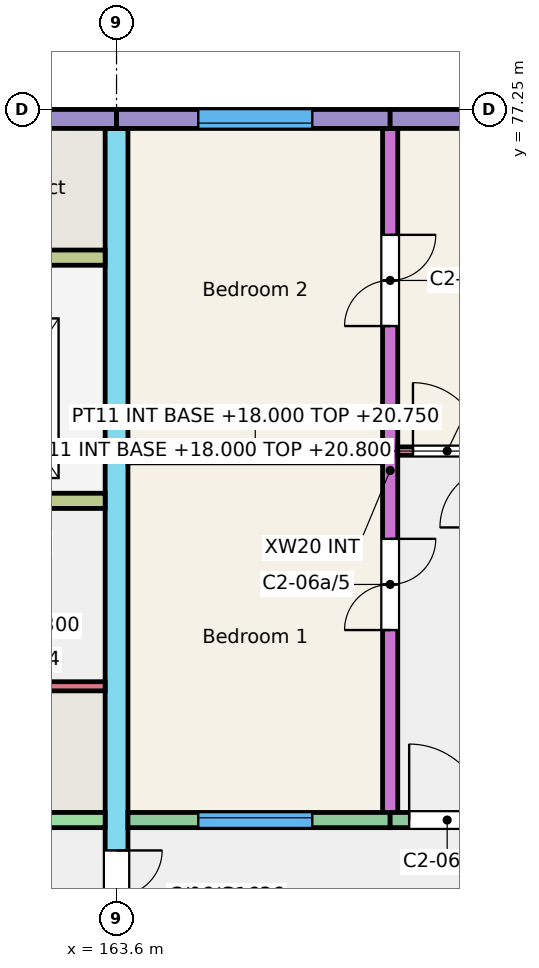
"""IFC4 building model, lengths in metres.
Left out: names, types, materials, properties, quantities, classifications, styles, units other than length and angle.
Written with IfcOpenShell. Run it as: python <this file> out.ifc"""

import sys

from ifc_helpers import new_model, si_unit, direction, frame, frame_2d, origin, place, context, subcontext, project, spatial, rectangle, extrude, element, fill, save


model = new_model("IFC4")
c1 = context("Model", 3, precision=1e-05, world=origin(), true_north=direction((0.0, 1.0)))
c2 = subcontext(c1, "Body", "Model", "MODEL_VIEW")
j1 = project(units=[si_unit("LENGTHUNIT", "METRE"), si_unit("PLANEANGLEUNIT", "RADIAN")], contexts=[c1])
p1 = place(None, origin())
s1 = spatial("IfcSite", under=j1, at=p1, CompositionType="ELEMENT")
p2 = place(p1, origin())
s2 = spatial("IfcBuilding", under=s1, at=p2, CompositionType="ELEMENT")
p3 = place(p2, frame((0.0, 0.0, 18.0)))
s3 = spatial("IfcBuildingStorey", under=s2, at=p3, CompositionType="ELEMENT", Elevation=18.0)
p4 = place(p3, frame((163.6, 66.0, 0.0), z_axis=(0.0, 0.0, 1.0), x_axis=(0.0, 1.0, 0.0)))
e1 = element("IfcWall", 1, at=p4, inside=s3, PredefinedType="SHEAR", context=c2, shape_type="SweptSolid", body=[
    extrude(rectangle(XDim=11.0, YDim=0.3, at=frame_2d((5.5, 0.0))), origin(), (0.0, 0.0, 1.0), 3.0),
])
p5 = place(p4, frame((0.3, 0.0, 0.0)))
e2 = element("IfcOpeningElement", 2, at=p5, cuts=e1, PredefinedType="OPENING", context=c2, shape_type="SweptSolid", body=[
    extrude(rectangle(XDim=1.2, YDim=2.1, at=frame_2d((0.6, 1.05))), frame((0.0, 0.16, 0.0), z_axis=(0.0, -1.0, 0.0), x_axis=(1.0, 0.0, 0.0)), (0.0, 0.0, 1.0), 0.32),
])
p6 = place(p3, frame((167.2, 68.0, 0.0), z_axis=(0.0, 0.0, 1.0), x_axis=(0.0, 1.0, 0.0)))
e3 = element("IfcWall", 3, at=p6, inside=s3, PredefinedType="SHEAR", context=c2, shape_type="SweptSolid", body=[
    extrude(rectangle(XDim=9.0, YDim=0.2, at=frame_2d((4.5, 0.0))), origin(), (0.0, 0.0, 1.0), 3.0),
])
p7 = place(p6, frame((2.4, 0.0, 0.0)))
e4 = element("IfcOpeningElement", 4, at=p7, cuts=e3, PredefinedType="OPENING", context=c2, shape_type="SweptSolid", body=[
    extrude(rectangle(XDim=1.2, YDim=2.1, at=frame_2d((0.6, 1.05))), frame((0.0, 0.11, 0.0), z_axis=(0.0, -1.0, 0.0), x_axis=(1.0, 0.0, 0.0)), (0.0, 0.0, 1.0), 0.22),
])
p8 = place(p6, frame((6.4, 0.0, 0.0)))
e5 = element("IfcOpeningElement", 5, at=p8, cuts=e3, PredefinedType="OPENING", context=c2, shape_type="SweptSolid", body=[
    extrude(rectangle(XDim=1.2, YDim=2.1, at=frame_2d((0.6, 1.05))), frame((0.0, 0.11, 0.0), z_axis=(0.0, -1.0, 0.0), x_axis=(1.0, 0.0, 0.0)), (0.0, 0.0, 1.0), 0.22),
])
p9 = place(p3, frame((160.625, 77.125, 0.0), z_axis=(0.0, 0.0, 1.0), x_axis=(1.0, 0.0, 0.0)))
e6 = element("IfcWall", 6, at=p9, inside=s3, PredefinedType="SOLIDWALL", context=c2, shape_type="SweptSolid", body=[
    extrude(rectangle(XDim=2.975, YDim=0.25, at=frame_2d((1.488, 0.0))), origin(), (0.0, 0.0, 1.0), 3.0),
])
p10 = place(p3, frame((157.6, 67.9, 0.0), z_axis=(0.0, 0.0, 1.0), x_axis=(1.0, 0.0, 0.0)))
e7 = element("IfcWall", 7, at=p10, inside=s3, PredefinedType="SHEAR", context=c2, shape_type="SweptSolid", body=[
    extrude(rectangle(XDim=5.85, YDim=0.2, at=frame_2d((2.925, 0.0))), origin(), (0.0, 0.0, 1.0), 3.0),
])
p11 = place(p10, frame((2.438, 0.0, 0.0)))
e8 = element("IfcOpeningElement", 8, at=p11, cuts=e7, PredefinedType="OPENING", context=c2, shape_type="SweptSolid", body=[
    extrude(rectangle(XDim=1.1, YDim=2.1, at=frame_2d((0.55, 1.05))), frame((0.0, 0.11, 0.0), z_axis=(0.0, -1.0, 0.0), x_axis=(1.0, 0.0, 0.0)), (0.0, 0.0, 1.0), 0.22),
])
p12 = place(p3, frame((157.725, 72.1, 0.0), z_axis=(0.0, 0.0, 1.0), x_axis=(1.0, 0.0, 0.0)))
e9 = element("IfcWall", 9, at=p12, inside=s3, PredefinedType="SHEAR", context=c2, shape_type="SweptSolid", body=[
    extrude(rectangle(XDim=5.725, YDim=0.2, at=frame_2d((2.862, 0.0))), origin(), (0.0, 0.0, 1.0), 3.0),
])
p13 = place(p12, frame((0.95, 0.0, 0.0)))
e10 = element("IfcOpeningElement", 10, at=p13, cuts=e9, PredefinedType="OPENING", context=c2, shape_type="SweptSolid", body=[
    extrude(rectangle(XDim=1.0, YDim=2.1, at=frame_2d((0.5, 1.05))), frame((0.0, 0.11, 0.0), z_axis=(0.0, -1.0, 0.0), x_axis=(1.0, 0.0, 0.0)), (0.0, 0.0, 1.0), 0.22),
])
p14 = place(p12, frame((3.863, 0.0, 0.0)))
e11 = element("IfcOpeningElement", 11, at=p14, cuts=e9, PredefinedType="OPENING", context=c2, shape_type="SweptSolid", body=[
    extrude(rectangle(XDim=1.1, YDim=2.1, at=frame_2d((0.55, 1.05))), frame((0.0, 0.11, 0.0), z_axis=(0.0, -1.0, 0.0), x_axis=(1.0, 0.0, 0.0)), (0.0, 0.0, 1.0), 0.22),
])
p15 = place(p3, frame((160.825, 75.3, 0.0), z_axis=(0.0, 0.0, 1.0), x_axis=(1.0, 0.0, 0.0)))
e12 = element("IfcWall", 12, at=p15, inside=s3, PredefinedType="SHEAR", context=c2, shape_type="SweptSolid", body=[
    extrude(rectangle(XDim=2.625, YDim=0.2, at=frame_2d((1.312, 0.0))), origin(), (0.0, 0.0, 1.0), 3.0),
])
p16 = place(p3, frame((162.32, 69.66, 0.0), z_axis=(0.0, 0.0, 1.0), x_axis=(1.0, 0.0, 0.0)))
e13 = element("IfcWall", 13, at=p16, inside=s3, PredefinedType="SHEAR", context=c2, shape_type="SweptSolid", body=[
    extrude(rectangle(XDim=1.13, YDim=0.12, at=frame_2d((0.565, 0.0))), origin(), (0.0, 0.0, 1.0), 3.0),
])
p17 = place(p3, frame((163.6, 77.125, 0.0), z_axis=(0.0, 0.0, 1.0), x_axis=(1.0, 0.0, 0.0)))
e14 = element("IfcWall", 14, at=p17, inside=s3, PredefinedType="SOLIDWALL", context=c2, shape_type="SweptSolid", body=[
    extrude(rectangle(XDim=3.6, YDim=0.25, at=frame_2d((1.8, 0.0))), origin(), (0.0, 0.0, 1.0), 3.0),
])
p18 = place(p17, frame((1.075, 0.0, 0.9)))
e15 = element("IfcOpeningElement", 15, at=p18, cuts=e14, PredefinedType="OPENING", context=c2, shape_type="SweptSolid", body=[
    extrude(rectangle(XDim=1.5, YDim=1.5, at=frame_2d((0.75, 0.75))), frame((0.0, 0.135, 0.0), z_axis=(0.0, -1.0, 0.0), x_axis=(1.0, 0.0, 0.0)), (0.0, 0.0, 1.0), 0.27),
])
p19 = place(p3, frame((163.75, 67.9, 0.0), z_axis=(0.0, 0.0, 1.0), x_axis=(1.0, 0.0, 0.0)))
e16 = element("IfcWall", 16, at=p19, inside=s3, PredefinedType="SOLIDWALL", context=c2, shape_type="SweptSolid", body=[
    extrude(rectangle(XDim=3.45, YDim=0.2, at=frame_2d((1.725, 0.0))), origin(), (0.0, 0.0, 1.0), 3.0),
])
p20 = place(p19, frame((0.925, 0.0, 0.9)))
e17 = element("IfcOpeningElement", 17, at=p20, cuts=e16, PredefinedType="OPENING", context=c2, shape_type="SweptSolid", body=[
    extrude(rectangle(XDim=1.5, YDim=1.5, at=frame_2d((0.75, 0.75))), frame((0.0, 0.11, 0.0), z_axis=(0.0, -1.0, 0.0), x_axis=(1.0, 0.0, 0.0)), (0.0, 0.0, 1.0), 0.22),
])
p21 = place(p3, frame((167.2, 77.125, 0.0), z_axis=(0.0, 0.0, 1.0), x_axis=(1.0, 0.0, 0.0)))
e18 = element("IfcWall", 18, at=p21, inside=s3, PredefinedType="SOLIDWALL", context=c2, shape_type="SweptSolid", body=[
    extrude(rectangle(XDim=3.6, YDim=0.25, at=frame_2d((1.8, 0.0))), origin(), (0.0, 0.0, 1.0), 3.0),
])
p22 = place(p21, frame((1.05, 0.0, 0.9)))
e19 = element("IfcOpeningElement", 19, at=p22, cuts=e18, PredefinedType="OPENING", context=c2, shape_type="SweptSolid", body=[
    extrude(rectangle(XDim=1.5, YDim=1.5, at=frame_2d((0.75, 0.75))), frame((0.0, 0.135, 0.0), z_axis=(0.0, -1.0, 0.0), x_axis=(1.0, 0.0, 0.0)), (0.0, 0.0, 1.0), 0.27),
])
p23 = place(p3, frame((167.2, 67.9, 0.0), z_axis=(0.0, 0.0, 1.0), x_axis=(1.0, 0.0, 0.0)))
e20 = element("IfcWall", 20, at=p23, inside=s3, PredefinedType="SOLIDWALL", context=c2, shape_type="SweptSolid", body=[
    extrude(rectangle(XDim=3.6, YDim=0.2, at=frame_2d((1.8, 0.0))), origin(), (0.0, 0.0, 1.0), 3.0),
])
p24 = place(p23, frame((1.905, 0.0, 1.1)))
e21 = element("IfcOpeningElement", 21, at=p24, cuts=e20, PredefinedType="OPENING", context=c2, shape_type="SweptSolid", body=[
    extrude(rectangle(XDim=1.2, YDim=1.3, at=frame_2d((0.6, 0.65))), frame((0.0, 0.11, 0.0), z_axis=(0.0, -1.0, 0.0), x_axis=(1.0, 0.0, 0.0)), (0.0, 0.0, 1.0), 0.22),
])
p25 = place(p23, frame((0.25, 0.0, 0.0)))
e22 = element("IfcOpeningElement", 22, at=p25, cuts=e20, PredefinedType="OPENING", context=c2, shape_type="SweptSolid", body=[
    extrude(rectangle(XDim=1.0, YDim=2.1, at=frame_2d((0.5, 1.05))), frame((0.0, 0.11, 0.0), z_axis=(0.0, -1.0, 0.0), x_axis=(1.0, 0.0, 0.0)), (0.0, 0.0, 1.0), 0.22),
])
p26 = place(p3, frame((167.3, 72.755, 0.0), z_axis=(0.0, 0.0, 1.0), x_axis=(1.0, 0.0, 0.0)))
e23 = element("IfcWall", 23, at=p26, inside=s3, PredefinedType="PARTITIONING", context=c2, shape_type="SweptSolid", body=[
    extrude(rectangle(XDim=3.4, YDim=0.11, at=frame_2d((1.7, 0.0))), origin(), (0.0, 0.0, 1.0), 2.8),
])
p27 = place(p26, frame((0.2, 0.0, 0.0)))
e24 = element("IfcOpeningElement", 24, at=p27, cuts=e23, PredefinedType="OPENING", context=c2, shape_type="SweptSolid", body=[
    extrude(rectangle(XDim=0.9, YDim=2.1, at=frame_2d((0.45, 1.05))), frame((0.0, 0.065, 0.0), z_axis=(0.0, -1.0, 0.0), x_axis=(1.0, 0.0, 0.0)), (0.0, 0.0, 1.0), 0.13),
])
p28 = place(p3, frame((163.75, 72.655, 0.0), z_axis=(0.0, 0.0, 1.0), x_axis=(1.0, 0.0, 0.0)))
e25 = element("IfcWall", 25, at=p28, inside=s3, PredefinedType="PARTITIONING", context=c2, shape_type="SweptSolid", body=[
    extrude(rectangle(XDim=3.35, YDim=0.11, at=frame_2d((1.675, 0.0))), origin(), (0.0, 0.0, 1.0), 2.75),
])
p29 = place(p20, origin())
e26 = element("IfcWindow", 26, at=p29, inside=s3, PartitioningType="SINGLE_PANEL", PredefinedType="WINDOW", context=c2, shape_type="SweptSolid", body=[
    extrude(rectangle(XDim=1.5, YDim=1.5, at=frame_2d((0.75, 0.75))), frame((0.0, 0.06, 0.0), z_axis=(0.0, -1.0, 0.0), x_axis=(1.0, 0.0, 0.0)), (0.0, 0.0, 1.0), 0.06),
])
fill(e17, e26)
p30 = place(p18, origin())
e27 = element("IfcWindow", 27, at=p30, inside=s3, PartitioningType="SINGLE_PANEL", PredefinedType="WINDOW", context=c2, shape_type="SweptSolid", body=[
    extrude(rectangle(XDim=1.5, YDim=1.5, at=frame_2d((0.75, 0.75))), frame((0.0, -0.025, 0.0), z_axis=(0.0, -1.0, 0.0), x_axis=(1.0, 0.0, 0.0)), (0.0, 0.0, 1.0), 0.06),
])
fill(e15, e27)
p31 = place(p25, origin())
e28 = element("IfcDoor", 28, at=p31, inside=s3, OperationType="SINGLE_SWING_LEFT", PredefinedType="DOOR", context=c2, shape_type="SweptSolid", body=[
    extrude(rectangle(XDim=1.0, YDim=2.1, at=frame_2d((0.5, 1.05))), frame((0.0, 0.025, 0.0), z_axis=(0.0, -1.0, 0.0), x_axis=(1.0, 0.0, 0.0)), (0.0, 0.0, 1.0), 0.05),
])
fill(e22, e28)
p32 = place(p27, origin())
e29 = element("IfcDoor", 29, at=p32, inside=s3, OperationType="SINGLE_SWING_LEFT", PredefinedType="DOOR", context=c2, shape_type="SweptSolid", body=[
    extrude(rectangle(XDim=0.9, YDim=2.1, at=frame_2d((0.45, 1.05))), frame((0.0, 0.025, 0.0), z_axis=(0.0, -1.0, 0.0), x_axis=(1.0, 0.0, 0.0)), (0.0, 0.0, 1.0), 0.05),
])
fill(e24, e29)
p33 = place(p7, origin())
e30 = element("IfcDoor", 30, at=p33, inside=s3, OperationType="DOUBLE_DOOR_SINGLE_SWING", PredefinedType="DOOR", context=c2, shape_type="SweptSolid", body=[
    extrude(rectangle(XDim=1.2, YDim=2.1, at=frame_2d((0.6, 1.05))), frame((0.0, 0.025, 0.0), z_axis=(0.0, -1.0, 0.0), x_axis=(1.0, 0.0, 0.0)), (0.0, 0.0, 1.0), 0.05),
])
fill(e4, e30)
p34 = place(p8, origin())
e31 = element("IfcDoor", 31, at=p34, inside=s3, OperationType="DOUBLE_DOOR_SINGLE_SWING", PredefinedType="DOOR", context=c2, shape_type="SweptSolid", body=[
    extrude(rectangle(XDim=1.2, YDim=2.1, at=frame_2d((0.6, 1.05))), frame((0.0, 0.025, 0.0), z_axis=(0.0, -1.0, 0.0), x_axis=(1.0, 0.0, 0.0)), (0.0, 0.0, 1.0), 0.05),
])
fill(e5, e31)
p35 = place(p5, origin())
e32 = element("IfcDoor", 32, at=p35, inside=s3, OperationType="DOUBLE_DOOR_SINGLE_SWING", PredefinedType="DOOR", context=c2, shape_type="SweptSolid", body=[
    extrude(rectangle(XDim=1.2, YDim=2.1, at=frame_2d((0.6, 1.05))), frame((0.0, 0.025, 0.0), z_axis=(0.0, -1.0, 0.0), x_axis=(1.0, 0.0, 0.0)), (0.0, 0.0, 1.0), 0.05),
])
fill(e2, e32)
save(model, sys.argv[1])
